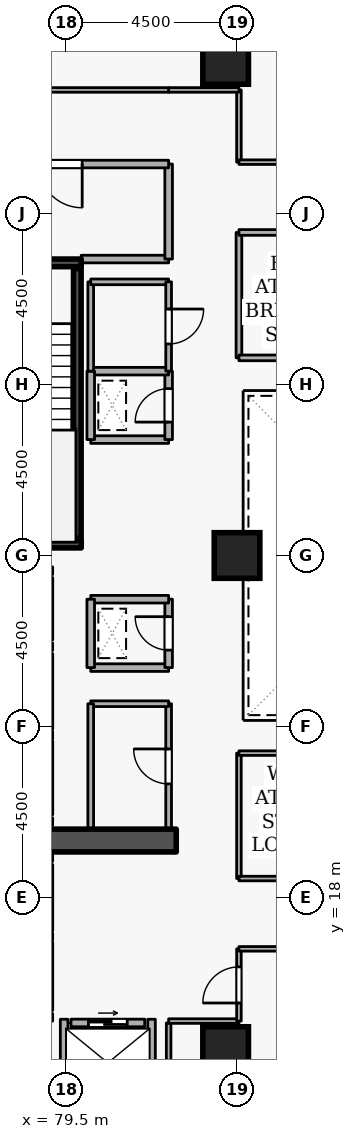
"""IFC4 building model, lengths in metres.
Left out: names, types, materials, properties, quantities, classifications, styles, units other than length and angle.
Written with IfcOpenShell. Run it as: python <this file> out.ifc"""

import sys

from ifc_helpers import new_model, si_unit, direction, frame, frame_2d, origin, origin_2d, place, context, subcontext, project, spatial, rectangle, extrude, element, fill, save


model = new_model("IFC4")
c1 = context("Model", 3, precision=1e-05, world=origin(), true_north=direction((0.0, 1.0)))
c2 = subcontext(c1, "Body", "Model", "MODEL_VIEW")
j1 = project(units=[si_unit("LENGTHUNIT", "METRE"), si_unit("PLANEANGLEUNIT", "RADIAN")], contexts=[c1])
p1 = place(None, origin())
s1 = spatial("IfcSite", under=j1, at=p1, CompositionType="ELEMENT")
p2 = place(p1, origin())
s2 = spatial("IfcBuilding", under=s1, at=p2, CompositionType="ELEMENT")
p3 = place(p2, frame((0.0, 0.0, 87.3)))
s3 = spatial("IfcBuildingStorey", under=s2, at=p3, CompositionType="ELEMENT", Elevation=87.3)
p4 = place(p3, frame((76.7, 19.5, 0.0), z_axis=(0.0, 0.0, 1.0), x_axis=(1.0, 0.0, 0.0)))
e1 = element("IfcWall", 1, at=p4, inside=s3, PredefinedType="SHEAR", context=c2, shape_type="SweptSolid", body=[
    extrude(rectangle(XDim=5.7, YDim=0.6, at=frame_2d((2.85, 0.0))), origin(), (0.0, 0.0, 1.0), 3.6),
])
for number, where, z_axis, x_axis in (
    (2, (83.7, 14.0, 0.0), (0.0, 0.0, 1.0), (1.0, 0.0, 0.0)),
    (3, (83.7, 40.0, 0.0), (0.0, 0.0, 1.0), (1.0, 0.0, 0.0)),
    (4, (84.0, 27.0, 0.0), (0.0, 0.0, 1.0), (1.0, 0.0, 0.0)),
):
    element("IfcColumn", number, at=place(p3, frame(where, z_axis=z_axis, x_axis=x_axis)), inside=s3, PredefinedType="COLUMN", context=c2, shape_type="SweptSolid", body=[
        extrude(rectangle(XDim=1.2, YDim=1.2, at=origin_2d()), origin(), (0.0, 0.0, 1.0), 3.6),
    ])
p5 = place(p3, frame((79.05, 24.78, 0.0), z_axis=(0.0, 0.0, 1.0), x_axis=(0.0, 1.0, 0.0)))
e5 = element("IfcWall", 5, at=p5, inside=s3, PredefinedType="STANDARD", context=c2, shape_type="SweptSolid", body=[
    extrude(rectangle(XDim=1.64, YDim=0.2, at=frame_2d((0.82, 0.0))), origin(), (0.0, 0.0, 1.0), 3.34),
])
p6 = place(p5, frame((0.31, 0.0, 0.0)))
e6 = element("IfcOpeningElement", 6, at=p6, cuts=e5, PredefinedType="OPENING", context=c2, shape_type="SweptSolid", body=[
    extrude(rectangle(XDim=1.02, YDim=2.06, at=frame_2d((0.51, 1.03))), frame((0.0, 0.11, 0.0), z_axis=(0.0, -1.0, 0.0), x_axis=(1.0, 0.0, 0.0)), (0.0, 0.0, 1.0), 0.22),
])
p7 = place(p3, frame((79.05, 22.43, 0.0), z_axis=(0.0, 0.0, 1.0), x_axis=(0.0, 1.0, 0.0)))
e7 = element("IfcWall", 7, at=p7, inside=s3, PredefinedType="STANDARD", context=c2, shape_type="SweptSolid", body=[
    extrude(rectangle(XDim=1.99, YDim=0.2, at=frame_2d((0.995, 0.0))), origin(), (0.0, 0.0, 1.0), 3.34),
])
p8 = place(p3, frame((79.05, 20.18, 0.0), z_axis=(0.0, 0.0, 1.0), x_axis=(0.0, 1.0, 0.0)))
e8 = element("IfcWall", 8, at=p8, inside=s3, PredefinedType="STANDARD", context=c2, shape_type="SweptSolid", body=[
    extrude(rectangle(XDim=1.94, YDim=0.2, at=frame_2d((0.97, 0.0))), origin(), (0.0, 0.0, 1.0), 3.34),
])
p9 = place(p3, frame((79.05, 17.13, 0.0), z_axis=(0.0, 0.0, 1.0), x_axis=(0.0, 1.0, 0.0)))
e9 = element("IfcWall", 9, at=p9, inside=s3, PredefinedType="STANDARD", context=c2, shape_type="SweptSolid", body=[
    extrude(rectangle(XDim=1.74, YDim=0.2, at=frame_2d((0.87, 0.0))), origin(), (0.0, 0.0, 1.0), 3.34),
])
p10 = place(p9, frame((0.36, 0.0, 0.0)))
e10 = element("IfcOpeningElement", 10, at=p10, cuts=e9, PredefinedType="OPENING", context=c2, shape_type="SweptSolid", body=[
    extrude(rectangle(XDim=1.02, YDim=2.06, at=frame_2d((0.51, 1.03))), frame((0.0, 0.11, 0.0), z_axis=(0.0, -1.0, 0.0), x_axis=(1.0, 0.0, 0.0)), (0.0, 0.0, 1.0), 0.22),
])
p11 = place(p3, frame((79.05, 15.03, 0.0), z_axis=(0.0, 0.0, 1.0), x_axis=(0.0, 1.0, 0.0)))
e11 = element("IfcWall", 11, at=p11, inside=s3, PredefinedType="STANDARD", context=c2, shape_type="SweptSolid", body=[
    extrude(rectangle(XDim=1.79, YDim=0.2, at=frame_2d((0.895, 0.0))), origin(), (0.0, 0.0, 1.0), 3.34),
])
p12 = place(p11, frame((0.385, 0.0, 0.0)))
e12 = element("IfcOpeningElement", 12, at=p12, cuts=e11, PredefinedType="OPENING", context=c2, shape_type="SweptSolid", body=[
    extrude(rectangle(XDim=1.02, YDim=2.06, at=frame_2d((0.51, 1.03))), frame((0.0, 0.11, 0.0), z_axis=(0.0, -1.0, 0.0), x_axis=(1.0, 0.0, 0.0)), (0.0, 0.0, 1.0), 0.22),
])
p13 = place(p3, frame((79.63, 14.7, 0.0), z_axis=(0.0, 0.0, 1.0), x_axis=(1.0, 0.0, 0.0)))
e13 = element("IfcWall", 13, at=p13, inside=s3, PredefinedType="STANDARD", context=c2, shape_type="SweptSolid", body=[
    extrude(rectangle(XDim=1.94, YDim=0.2, at=frame_2d((0.97, 0.0))), origin(), (0.0, 0.0, 1.0), 3.34),
])
p14 = place(p13, frame((0.46, 0.0, 0.0)))
e14 = element("IfcOpeningElement", 14, at=p14, cuts=e13, PredefinedType="OPENING", context=c2, shape_type="SweptSolid", body=[
    extrude(rectangle(XDim=1.02, YDim=2.06, at=frame_2d((0.51, 1.03))), frame((0.0, 0.11, 0.0), z_axis=(0.0, -1.0, 0.0), x_axis=(1.0, 0.0, 0.0)), (0.0, 0.0, 1.0), 0.22),
])
for number, where, z_axis, x_axis in (
    (15, (81.75, 12.612, 0.0), (0.0, 0.0, 1.0), (0.0, 1.0, 0.0)),
    (16, (79.45, 12.612, 0.0), (0.0, 0.0, 1.0), (0.0, 1.0, 0.0)),
):
    element("IfcWall", number, at=place(p3, frame(where, z_axis=z_axis, x_axis=x_axis)), inside=s3, PredefinedType="STANDARD", context=c2, shape_type="SweptSolid", body=[
        extrude(rectangle(XDim=2.186, YDim=0.2, at=frame_2d((1.093, 0.0))), origin(), (0.0, 0.0, 1.0), 3.34),
    ])
p15 = place(p3, frame((76.55, 34.7, 0.0), z_axis=(0.0, 0.0, 1.0), x_axis=(1.0, 0.0, 0.0)))
e17 = element("IfcWall", 17, at=p15, inside=s3, PredefinedType="SHEAR", context=c2, shape_type="SweptSolid", body=[
    extrude(rectangle(XDim=3.35, YDim=0.2, at=frame_2d((1.675, 0.0))), origin(), (0.0, 0.0, 1.0), 3.6),
])
p16 = place(p15, frame((1.125, 0.0, 0.0)))
e18 = element("IfcOpeningElement", 18, at=p16, cuts=e17, PredefinedType="OPENING", context=c2, shape_type="SweptSolid", body=[
    extrude(rectangle(XDim=1.1, YDim=2.1, at=frame_2d((0.55, 1.05))), frame((0.0, 0.11, 0.0), z_axis=(0.0, -1.0, 0.0), x_axis=(1.0, 0.0, 0.0)), (0.0, 0.0, 1.0), 0.22),
])
p17 = place(p3, frame((79.9, 27.3, 0.0), z_axis=(0.0, 0.0, 1.0), x_axis=(-1.0, 0.0, 0.0)))
e19 = element("IfcWall", 19, at=p17, inside=s3, PredefinedType="SHEAR", context=c2, shape_type="SweptSolid", body=[
    extrude(rectangle(XDim=3.35, YDim=0.2, at=frame_2d((1.675, 0.0))), origin(), (0.0, 0.0, 1.0), 3.6),
])
p18 = place(p3, frame((79.797, 27.45, 0.0), z_axis=(0.0, 0.0, 1.0), x_axis=(0.0, 1.0, 0.0)))
e20 = element("IfcWall", 20, at=p18, inside=s3, PredefinedType="SHEAR", context=c2, shape_type="SweptSolid", body=[
    extrude(rectangle(XDim=7.1, YDim=0.2, at=frame_2d((3.55, 0.0))), origin(), (0.0, 0.0, 1.0), 3.6),
])
p19 = place(p3, frame((79.9, 34.8, 0.0), z_axis=(0.0, 0.0, 1.0), x_axis=(1.0, 0.0, 0.0)))
e21 = element("IfcWall", 21, at=p19, inside=s3, PredefinedType="STANDARD", context=c2, shape_type="SweptSolid", body=[
    extrude(rectangle(XDim=2.3, YDim=0.2, at=frame_2d((1.15, 0.0))), origin(), (0.0, 0.0, 1.0), 2.545),
])
p20 = place(p3, frame((82.2, 34.8, 0.0), z_axis=(0.0, 0.0, 1.0), x_axis=(0.0, 1.0, 0.0)))
e22 = element("IfcWall", 22, at=p20, inside=s3, PredefinedType="STANDARD", context=c2, shape_type="SweptSolid", body=[
    extrude(rectangle(XDim=2.5, YDim=0.2, at=frame_2d((1.25, 0.0))), origin(), (0.0, 0.0, 1.0), 3.34),
])
p21 = place(p3, frame((82.2, 37.3, 0.0), z_axis=(0.0, 0.0, 1.0), x_axis=(-1.0, 0.0, 0.0)))
e23 = element("IfcWall", 23, at=p21, inside=s3, PredefinedType="STANDARD", context=c2, shape_type="SweptSolid", body=[
    extrude(rectangle(XDim=5.7, YDim=0.2, at=frame_2d((2.85, 0.0))), origin(), (0.0, 0.0, 1.0), 3.34),
])
p22 = place(p21, frame((2.275, 0.0, 0.0)))
e24 = element("IfcOpeningElement", 24, at=p22, cuts=e23, PredefinedType="OPENING", context=c2, shape_type="SweptSolid", body=[
    extrude(rectangle(XDim=1.15, YDim=2.1, at=frame_2d((0.575, 1.05))), frame((0.0, 0.11, 0.0), z_axis=(0.0, -1.0, 0.0), x_axis=(1.0, 0.0, 0.0)), (0.0, 0.0, 1.0), 0.22),
])
p23 = place(p3, frame((80.15, 24.05, 0.0), z_axis=(0.0, 0.0, 1.0), x_axis=(1.0, 0.0, 0.0)))
e25 = element("IfcWall", 25, at=p23, inside=s3, PredefinedType="STANDARD", context=c2, shape_type="SweptSolid", body=[
    extrude(rectangle(XDim=2.05, YDim=0.2, at=frame_2d((1.025, 0.0))), origin(), (0.0, 0.0, 1.0), 3.34),
])
p24 = place(p3, frame((82.2, 24.05, 0.0), z_axis=(0.0, 0.0, 1.0), x_axis=(0.0, 1.0, 0.0)))
e26 = element("IfcWall", 26, at=p24, inside=s3, PredefinedType="STANDARD", context=c2, shape_type="SweptSolid", body=[
    extrude(rectangle(XDim=1.8, YDim=0.2, at=frame_2d((0.9, 0.0))), origin(), (0.0, 0.0, 1.0), 3.34),
])
p25 = place(p24, frame((0.46, 0.0, 0.0)))
e27 = element("IfcOpeningElement", 27, at=p25, cuts=e26, PredefinedType="OPENING", context=c2, shape_type="SweptSolid", body=[
    extrude(rectangle(XDim=0.88, YDim=2.04, at=frame_2d((0.44, 1.02))), frame((0.0, 0.11, 0.0), z_axis=(0.0, -1.0, 0.0), x_axis=(1.0, 0.0, 0.0)), (0.0, 0.0, 1.0), 0.22),
])
p26 = place(p3, frame((82.2, 25.85, 0.0), z_axis=(0.0, 0.0, 1.0), x_axis=(-1.0, 0.0, 0.0)))
e28 = element("IfcWall", 28, at=p26, inside=s3, PredefinedType="STANDARD", context=c2, shape_type="SweptSolid", body=[
    extrude(rectangle(XDim=2.05, YDim=0.2, at=frame_2d((1.025, 0.0))), origin(), (0.0, 0.0, 1.0), 3.34),
])
p27 = place(p3, frame((80.15, 25.85, 0.0), z_axis=(0.0, 0.0, 1.0), x_axis=(0.0, -1.0, 0.0)))
e29 = element("IfcWall", 29, at=p27, inside=s3, PredefinedType="STANDARD", context=c2, shape_type="SweptSolid", body=[
    extrude(rectangle(XDim=1.8, YDim=0.2, at=frame_2d((0.9, 0.0))), origin(), (0.0, 0.0, 1.0), 3.34),
])
p28 = place(p3, frame((80.15, 30.05, 0.0), z_axis=(0.0, 0.0, 1.0), x_axis=(1.0, 0.0, 0.0)))
e30 = element("IfcWall", 30, at=p28, inside=s3, PredefinedType="STANDARD", context=c2, shape_type="SweptSolid", body=[
    extrude(rectangle(XDim=2.05, YDim=0.2, at=frame_2d((1.025, 0.0))), origin(), (0.0, 0.0, 1.0), 3.34),
])
p29 = place(p3, frame((82.2, 30.05, 0.0), z_axis=(0.0, 0.0, 1.0), x_axis=(0.0, 1.0, 0.0)))
e31 = element("IfcWall", 31, at=p29, inside=s3, PredefinedType="STANDARD", context=c2, shape_type="SweptSolid", body=[
    extrude(rectangle(XDim=1.8, YDim=0.2, at=frame_2d((0.9, 0.0))), origin(), (0.0, 0.0, 1.0), 3.34),
])
p30 = place(p29, frame((0.46, 0.0, 0.0)))
e32 = element("IfcOpeningElement", 32, at=p30, cuts=e31, PredefinedType="OPENING", context=c2, shape_type="SweptSolid", body=[
    extrude(rectangle(XDim=0.88, YDim=2.04, at=frame_2d((0.44, 1.02))), frame((0.0, 0.11, 0.0), z_axis=(0.0, -1.0, 0.0), x_axis=(1.0, 0.0, 0.0)), (0.0, 0.0, 1.0), 0.22),
])
p31 = place(p3, frame((82.2, 31.85, 0.0), z_axis=(0.0, 0.0, 1.0), x_axis=(-1.0, 0.0, 0.0)))
e33 = element("IfcWall", 33, at=p31, inside=s3, PredefinedType="STANDARD", context=c2, shape_type="SweptSolid", body=[
    extrude(rectangle(XDim=2.05, YDim=0.2, at=frame_2d((1.025, 0.0))), origin(), (0.0, 0.0, 1.0), 3.34),
])
p32 = place(p3, frame((80.15, 31.85, 0.0), z_axis=(0.0, 0.0, 1.0), x_axis=(0.0, -1.0, 0.0)))
e34 = element("IfcWall", 34, at=p32, inside=s3, PredefinedType="STANDARD", context=c2, shape_type="SweptSolid", body=[
    extrude(rectangle(XDim=1.8, YDim=0.2, at=frame_2d((0.9, 0.0))), origin(), (0.0, 0.0, 1.0), 3.34),
])
p33 = place(p3, frame((82.2, 19.8, 0.0), z_axis=(0.0, 0.0, 1.0), x_axis=(0.0, 1.0, 0.0)))
e35 = element("IfcWall", 35, at=p33, inside=s3, PredefinedType="PARTITIONING", context=c2, shape_type="SweptSolid", body=[
    extrude(rectangle(XDim=3.3, YDim=0.15, at=frame_2d((1.65, 0.0))), origin(), (0.0, 0.0, 1.0), 3.34),
])
p34 = place(p33, frame((1.19, 0.0, 0.0)))
e36 = element("IfcOpeningElement", 36, at=p34, cuts=e35, PredefinedType="OPENING", context=c2, shape_type="SweptSolid", body=[
    extrude(rectangle(XDim=0.92, YDim=2.08, at=frame_2d((0.46, 1.04))), frame((0.0, 0.085, 0.0), z_axis=(0.0, -1.0, 0.0), x_axis=(1.0, 0.0, 0.0)), (0.0, 0.0, 1.0), 0.17),
])
p35 = place(p3, frame((82.2, 23.1, 0.0), z_axis=(0.0, 0.0, 1.0), x_axis=(-1.0, 0.0, 0.0)))
e37 = element("IfcWall", 37, at=p35, inside=s3, PredefinedType="PARTITIONING", context=c2, shape_type="SweptSolid", body=[
    extrude(rectangle(XDim=2.05, YDim=0.15, at=frame_2d((1.025, 0.0))), origin(), (0.0, 0.0, 1.0), 3.34),
])
p36 = place(p3, frame((80.15, 23.1, 0.0), z_axis=(0.0, 0.0, 1.0), x_axis=(0.0, -1.0, 0.0)))
e38 = element("IfcWall", 38, at=p36, inside=s3, PredefinedType="PARTITIONING", context=c2, shape_type="SweptSolid", body=[
    extrude(rectangle(XDim=3.3, YDim=0.15, at=frame_2d((1.65, 0.0))), origin(), (0.0, 0.0, 1.0), 3.34),
])
p37 = place(p3, frame((80.15, 31.85, 0.0), z_axis=(0.0, 0.0, 1.0), x_axis=(0.0, 1.0, 0.0)))
e39 = element("IfcWall", 39, at=p37, inside=s3, PredefinedType="PARTITIONING", context=c2, shape_type="SweptSolid", body=[
    extrude(rectangle(XDim=2.35, YDim=0.15, at=frame_2d((1.175, 0.0))), origin(), (0.0, 0.0, 1.0), 3.34),
])
p38 = place(p3, frame((80.15, 34.2, 0.0), z_axis=(0.0, 0.0, 1.0), x_axis=(1.0, 0.0, 0.0)))
e40 = element("IfcWall", 40, at=p38, inside=s3, PredefinedType="PARTITIONING", context=c2, shape_type="SweptSolid", body=[
    extrude(rectangle(XDim=2.05, YDim=0.15, at=frame_2d((1.025, 0.0))), origin(), (0.0, 0.0, 1.0), 2.545),
])
p39 = place(p3, frame((82.2, 34.2, 0.0), z_axis=(0.0, 0.0, 1.0), x_axis=(0.0, -1.0, 0.0)))
e41 = element("IfcWall", 41, at=p39, inside=s3, PredefinedType="PARTITIONING", context=c2, shape_type="SweptSolid", body=[
    extrude(rectangle(XDim=2.35, YDim=0.15, at=frame_2d((1.175, 0.0))), origin(), (0.0, 0.0, 1.0), 3.34),
])
p40 = place(p39, frame((0.715, 0.0, 0.0)))
e42 = element("IfcOpeningElement", 42, at=p40, cuts=e41, PredefinedType="OPENING", context=c2, shape_type="SweptSolid", body=[
    extrude(rectangle(XDim=0.92, YDim=2.08, at=frame_2d((0.46, 1.04))), frame((0.0, 0.085, 0.0), z_axis=(0.0, -1.0, 0.0), x_axis=(1.0, 0.0, 0.0)), (0.0, 0.0, 1.0), 0.17),
])
p41 = place(p3, frame((82.2, 12.4, 0.0), z_axis=(0.0, 0.0, 1.0), x_axis=(0.0, 1.0, 0.0)))
e43 = element("IfcWall", 43, at=p41, inside=s3, PredefinedType="PARTITIONING", context=c2, shape_type="SweptSolid", body=[
    extrude(rectangle(XDim=2.3, YDim=0.12, at=frame_2d((1.15, 0.0))), origin(), (0.0, 0.0, 1.0), 3.34),
])
p42 = place(p3, frame((82.2, 14.75, 0.0), z_axis=(0.0, 0.0, 1.0), x_axis=(1.0, 0.0, 0.0)))
e44 = element("IfcWall", 44, at=p42, inside=s3, PredefinedType="PARTITIONING", context=c2, shape_type="SweptSolid", body=[
    extrude(rectangle(XDim=1.85, YDim=0.12, at=frame_2d((0.925, 0.0))), origin(), (0.0, 0.0, 1.0), 3.34),
])
p43 = place(p3, frame((84.05, 14.75, 0.0), z_axis=(0.0, 0.0, 1.0), x_axis=(0.0, 1.0, 0.0)))
e45 = element("IfcWall", 45, at=p43, inside=s3, PredefinedType="PARTITIONING", context=c2, shape_type="SweptSolid", body=[
    extrude(rectangle(XDim=1.9, YDim=0.12, at=frame_2d((0.95, 0.0))), origin(), (0.0, 0.0, 1.0), 3.34),
])
p44 = place(p43, frame((0.475, 0.0, 0.0)))
e46 = element("IfcOpeningElement", 46, at=p44, cuts=e45, PredefinedType="OPENING", context=c2, shape_type="SweptSolid", body=[
    extrude(rectangle(XDim=0.95, YDim=2.1, at=frame_2d((0.475, 1.05))), frame((0.0, 0.07, 0.0), z_axis=(0.0, -1.0, 0.0), x_axis=(1.0, 0.0, 0.0)), (0.0, 0.0, 1.0), 0.14),
])
p45 = place(p3, frame((84.05, 16.65, 0.0), z_axis=(0.0, 0.0, 1.0), x_axis=(1.0, 0.0, 0.0)))
e47 = element("IfcWall", 47, at=p45, inside=s3, PredefinedType="PARTITIONING", context=c2, shape_type="SweptSolid", body=[
    extrude(rectangle(XDim=1.3, YDim=0.12, at=frame_2d((0.65, 0.0))), origin(), (0.0, 0.0, 1.0), 3.34),
])
p46 = place(p3, frame((84.05, 37.35, 0.0), z_axis=(0.0, 0.0, 1.0), x_axis=(0.0, 1.0, 0.0)))
e48 = element("IfcWall", 48, at=p46, inside=s3, PredefinedType="PARTITIONING", context=c2, shape_type="SweptSolid", body=[
    extrude(rectangle(XDim=1.9, YDim=0.12, at=frame_2d((0.95, 0.0))), origin(), (0.0, 0.0, 1.0), 3.34),
])
p47 = place(p3, frame((84.05, 39.25, 0.0), z_axis=(0.0, 0.0, 1.0), x_axis=(-1.0, 0.0, 0.0)))
e49 = element("IfcWall", 49, at=p47, inside=s3, PredefinedType="PARTITIONING", context=c2, shape_type="SweptSolid", body=[
    extrude(rectangle(XDim=1.85, YDim=0.12, at=frame_2d((0.925, 0.0))), origin(), (0.0, 0.0, 1.0), 3.34),
])
p48 = place(p3, frame((82.2, 39.25, 0.0), z_axis=(0.0, 0.0, 1.0), x_axis=(-1.0, 0.0, 0.0)))
e50 = element("IfcWall", 50, at=p48, inside=s3, PredefinedType="PARTITIONING", context=c2, shape_type="SweptSolid", body=[
    extrude(rectangle(XDim=9.35, YDim=0.12, at=frame_2d((4.675, 0.0))), origin(), (0.0, 0.0, 1.0), 3.34),
])
p49 = place(p48, frame((4.15, 0.0, 0.0)))
e51 = element("IfcOpeningElement", 51, at=p49, cuts=e50, PredefinedType="OPENING", context=c2, shape_type="SweptSolid", body=[
    extrude(rectangle(XDim=1.05, YDim=2.1, at=frame_2d((0.525, 1.05))), frame((0.0, 0.07, 0.0), z_axis=(0.0, -1.0, 0.0), x_axis=(1.0, 0.0, 0.0)), (0.0, 0.0, 1.0), 0.14),
])
p50 = place(p3, frame((85.35, 37.35, 0.0), z_axis=(0.0, 0.0, 1.0), x_axis=(-1.0, 0.0, 0.0)))
e52 = element("IfcWall", 52, at=p50, inside=s3, PredefinedType="PARTITIONING", context=c2, shape_type="SweptSolid", body=[
    extrude(rectangle(XDim=1.3, YDim=0.12, at=frame_2d((0.65, 0.0))), origin(), (0.0, 0.0, 1.0), 3.34),
])
p51 = place(p3, frame((84.05, 32.2, 0.0), z_axis=(0.0, 0.0, 1.0), x_axis=(0.0, 1.0, 0.0)))
e53 = element("IfcWall", 53, at=p51, inside=s3, PredefinedType="PARTITIONING", context=c2, shape_type="SweptSolid", body=[
    extrude(rectangle(XDim=3.3, YDim=0.15, at=frame_2d((1.65, 0.0))), origin(), (0.0, 0.0, 1.0), 3.34),
])
p52 = place(p3, frame((84.05, 35.5, 0.0), z_axis=(0.0, 0.0, 1.0), x_axis=(1.0, 0.0, 0.0)))
e54 = element("IfcWall", 54, at=p52, inside=s3, PredefinedType="PARTITIONING", context=c2, shape_type="SweptSolid", body=[
    extrude(rectangle(XDim=8.9, YDim=0.15, at=frame_2d((4.45, 0.0))), origin(), (0.0, 0.0, 1.0), 3.34),
])
p53 = place(p52, frame((3.8, 0.0, 0.0)))
e55 = element("IfcOpeningElement", 55, at=p53, cuts=e54, PredefinedType="OPENING", context=c2, shape_type="SweptSolid", body=[
    extrude(rectangle(XDim=1.3, YDim=2.12, at=frame_2d((0.65, 1.06))), frame((0.0, 0.085, 0.0), z_axis=(0.0, -1.0, 0.0), x_axis=(1.0, 0.0, 0.0)), (0.0, 0.0, 1.0), 0.17),
])
p54 = place(p3, frame((92.95, 32.2, 0.0), z_axis=(0.0, 0.0, 1.0), x_axis=(-1.0, 0.0, 0.0)))
e56 = element("IfcWall", 56, at=p54, inside=s3, PredefinedType="PARTITIONING", context=c2, shape_type="SweptSolid", body=[
    extrude(rectangle(XDim=8.9, YDim=0.15, at=frame_2d((4.45, 0.0))), origin(), (0.0, 0.0, 1.0), 3.34),
])
p55 = place(p3, frame((84.05, 18.5, 0.0), z_axis=(0.0, 0.0, 1.0), x_axis=(0.0, 1.0, 0.0)))
e57 = element("IfcWall", 57, at=p55, inside=s3, PredefinedType="PARTITIONING", context=c2, shape_type="SweptSolid", body=[
    extrude(rectangle(XDim=3.3, YDim=0.12, at=frame_2d((1.65, 0.0))), origin(), (0.0, 0.0, 1.0), 3.34),
])
p56 = place(p3, frame((84.05, 21.8, 0.0), z_axis=(0.0, 0.0, 1.0), x_axis=(1.0, 0.0, 0.0)))
e58 = element("IfcWall", 58, at=p56, inside=s3, PredefinedType="PARTITIONING", context=c2, shape_type="SweptSolid", body=[
    extrude(rectangle(XDim=8.9, YDim=0.12, at=frame_2d((4.45, 0.0))), origin(), (0.0, 0.0, 1.0), 3.34),
])
p57 = place(p3, frame((92.95, 18.5, 0.0), z_axis=(0.0, 0.0, 1.0), x_axis=(-1.0, 0.0, 0.0)))
e59 = element("IfcWall", 59, at=p57, inside=s3, PredefinedType="PARTITIONING", context=c2, shape_type="SweptSolid", body=[
    extrude(rectangle(XDim=8.9, YDim=0.12, at=frame_2d((4.45, 0.0))), origin(), (0.0, 0.0, 1.0), 3.34),
])
p58 = place(p57, frame((3.975, 0.0, 0.0)))
e60 = element("IfcOpeningElement", 60, at=p58, cuts=e59, PredefinedType="OPENING", context=c2, shape_type="SweptSolid", body=[
    extrude(rectangle(XDim=0.95, YDim=2.1, at=frame_2d((0.475, 1.05))), frame((0.0, 0.07, 0.0), z_axis=(0.0, -1.0, 0.0), x_axis=(1.0, 0.0, 0.0)), (0.0, 0.0, 1.0), 0.14),
])
p59 = place(p14, origin())
e61 = element("IfcDoor", 61, at=p59, inside=s3, OperationType="SLIDING_TO_LEFT", PredefinedType="DOOR", context=c2, shape_type="SweptSolid", body=[
    extrude(rectangle(XDim=1.02, YDim=2.06, at=frame_2d((0.51, 1.03))), frame((0.0, 0.025, 0.0), z_axis=(0.0, -1.0, 0.0), x_axis=(1.0, 0.0, 0.0)), (0.0, 0.0, 1.0), 0.05),
])
fill(e14, e61)
p60 = place(p22, origin())
e62 = element("IfcDoor", 62, at=p60, inside=s3, OperationType="SINGLE_SWING_LEFT", PredefinedType="DOOR", context=c2, shape_type="SweptSolid", body=[
    extrude(rectangle(XDim=1.15, YDim=2.1, at=frame_2d((0.575, 1.05))), frame((0.0, 0.025, 0.0), z_axis=(0.0, -1.0, 0.0), x_axis=(1.0, 0.0, 0.0)), (0.0, 0.0, 1.0), 0.05),
])
fill(e24, e62)
p61 = place(p25, origin())
e63 = element("IfcDoor", 63, at=p61, inside=s3, OperationType="SINGLE_SWING_RIGHT", PredefinedType="DOOR", context=c2, shape_type="SweptSolid", body=[
    extrude(rectangle(XDim=0.88, YDim=2.04, at=frame_2d((0.44, 1.02))), frame((0.0, 0.025, 0.0), z_axis=(0.0, -1.0, 0.0), x_axis=(1.0, 0.0, 0.0)), (0.0, 0.0, 1.0), 0.05),
])
fill(e27, e63)
p62 = place(p30, origin())
e64 = element("IfcDoor", 64, at=p62, inside=s3, OperationType="SINGLE_SWING_LEFT", PredefinedType="DOOR", context=c2, shape_type="SweptSolid", body=[
    extrude(rectangle(XDim=0.88, YDim=2.04, at=frame_2d((0.44, 1.02))), frame((0.0, 0.025, 0.0), z_axis=(0.0, -1.0, 0.0), x_axis=(1.0, 0.0, 0.0)), (0.0, 0.0, 1.0), 0.05),
])
fill(e32, e64)
p63 = place(p34, origin())
e65 = element("IfcDoor", 65, at=p63, inside=s3, OperationType="SINGLE_SWING_RIGHT", PredefinedType="DOOR", context=c2, shape_type="SweptSolid", body=[
    extrude(rectangle(XDim=0.92, YDim=2.08, at=frame_2d((0.46, 1.04))), frame((0.0, 0.025, 0.0), z_axis=(0.0, -1.0, 0.0), x_axis=(1.0, 0.0, 0.0)), (0.0, 0.0, 1.0), 0.05),
])
fill(e36, e65)
p64 = place(p40, origin())
e66 = element("IfcDoor", 66, at=p64, inside=s3, OperationType="SINGLE_SWING_LEFT", PredefinedType="DOOR", context=c2, shape_type="SweptSolid", body=[
    extrude(rectangle(XDim=0.92, YDim=2.08, at=frame_2d((0.46, 1.04))), frame((0.0, 0.025, 0.0), z_axis=(0.0, -1.0, 0.0), x_axis=(1.0, 0.0, 0.0)), (0.0, 0.0, 1.0), 0.05),
])
fill(e42, e66)
p65 = place(p44, origin())
e67 = element("IfcDoor", 67, at=p65, inside=s3, OperationType="SINGLE_SWING_LEFT", PredefinedType="DOOR", context=c2, shape_type="SweptSolid", body=[
    extrude(rectangle(XDim=0.95, YDim=2.1, at=frame_2d((0.475, 1.05))), frame((0.0, 0.025, 0.0), z_axis=(0.0, -1.0, 0.0), x_axis=(1.0, 0.0, 0.0)), (0.0, 0.0, 1.0), 0.05),
])
fill(e46, e67)
save(model, sys.argv[1])
